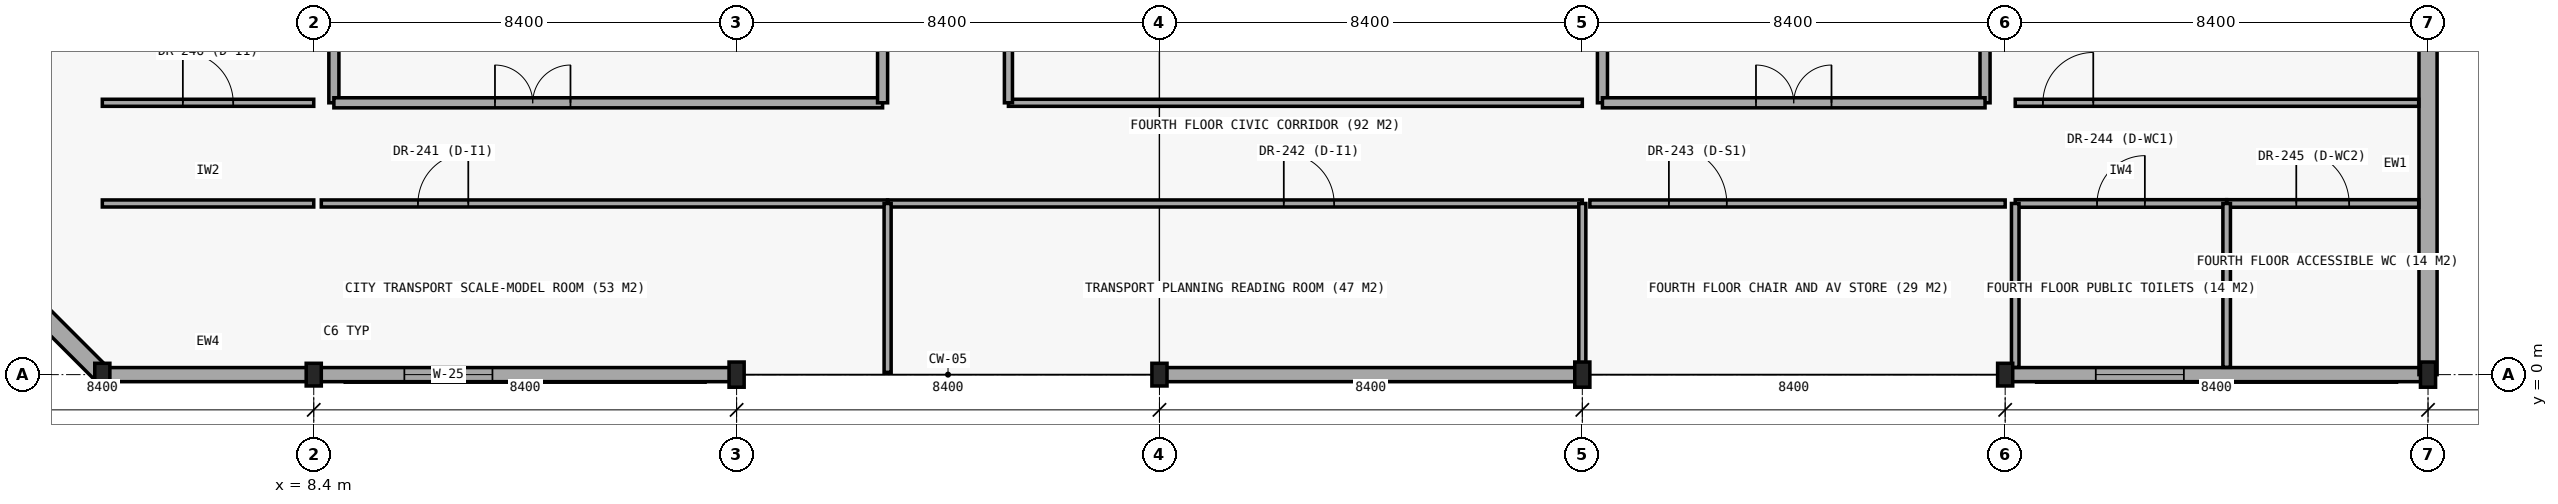
"""IFC4 building model, lengths in metres.
Left out: names, types, materials, properties, quantities, classifications, styles, units other than length and angle.
Written with IfcOpenShell. Run it as: python <this file> out.ifc"""

import sys

from ifc_helpers import new_model, si_unit, direction, frame, frame_2d, origin, origin_2d, place, context, subcontext, project, spatial, rectangle, i_section, extrude, element, fill, save


model = new_model("IFC4")
c1 = context("Model", 3, precision=1e-05, world=origin(), true_north=direction((0.0, 1.0)))
c2 = subcontext(c1, "Body", "Model", "MODEL_VIEW")
j1 = project(units=[si_unit("LENGTHUNIT", "METRE"), si_unit("PLANEANGLEUNIT", "RADIAN")], contexts=[c1])
p1 = place(None, origin())
s1 = spatial("IfcSite", under=j1, at=p1, CompositionType="ELEMENT")
p2 = place(p1, origin())
s2 = spatial("IfcBuilding", under=s1, at=p2, CompositionType="ELEMENT")
p3 = place(p2, frame((0.0, 0.0, 17.4)))
s3 = spatial("IfcBuildingStorey", under=s2, at=p3, CompositionType="ELEMENT", Elevation=17.4)
p4 = place(p3, frame((8.4, 0.0, 0.0), z_axis=(0.0, 0.0, 1.0), x_axis=(1.0, 0.0, 0.0)))
e1 = element("IfcColumn", 1, at=p4, inside=s3, PredefinedType="COLUMN", context=c2, shape_type="SweptSolid", body=[
    extrude(i_section(OverallWidth=0.3, OverallDepth=0.45, WebThickness=0.014, FlangeThickness=0.026, FilletRadius=0.027, at=origin_2d()), origin(), (0.0, 0.0, 1.0), 4.2),
])
p5 = place(p3, frame((16.8, 0.0, 0.0), z_axis=(0.0, 0.0, 1.0), x_axis=(1.0, 0.0, 0.0)))
e2 = element("IfcColumn", 2, at=p5, inside=s3, PredefinedType="COLUMN", context=c2, shape_type="SweptSolid", body=[
    extrude(i_section(OverallWidth=0.3, OverallDepth=0.5, WebThickness=0.014, FlangeThickness=0.028, FilletRadius=0.027, at=origin_2d()), origin(), (0.0, 0.0, 1.0), 4.2),
])
p6 = place(p3, frame((25.2, 0.0, 0.0), z_axis=(0.0, 0.0, 1.0), x_axis=(1.0, 0.0, 0.0)))
e3 = element("IfcColumn", 3, at=p6, inside=s3, PredefinedType="COLUMN", context=c2, shape_type="SweptSolid", body=[
    extrude(i_section(OverallWidth=0.3, OverallDepth=0.45, WebThickness=0.014, FlangeThickness=0.026, FilletRadius=0.027, at=origin_2d()), origin(), (0.0, 0.0, 1.0), 4.2),
])
p7 = place(p3, frame((33.6, 0.0, 0.0), z_axis=(0.0, 0.0, 1.0), x_axis=(1.0, 0.0, 0.0)))
e4 = element("IfcColumn", 4, at=p7, inside=s3, PredefinedType="COLUMN", context=c2, shape_type="SweptSolid", body=[
    extrude(i_section(OverallWidth=0.3, OverallDepth=0.5, WebThickness=0.014, FlangeThickness=0.028, FilletRadius=0.027, at=origin_2d()), origin(), (0.0, 0.0, 1.0), 4.2),
])
p8 = place(p3, frame((42.0, 0.0, 0.0), z_axis=(0.0, 0.0, 1.0), x_axis=(1.0, 0.0, 0.0)))
e5 = element("IfcColumn", 5, at=p8, inside=s3, PredefinedType="COLUMN", context=c2, shape_type="SweptSolid", body=[
    extrude(i_section(OverallWidth=0.3, OverallDepth=0.45, WebThickness=0.014, FlangeThickness=0.026, FilletRadius=0.027, at=origin_2d()), origin(), (0.0, 0.0, 1.0), 4.2),
])
p9 = place(p3, frame((50.4, 0.0, 0.0), z_axis=(0.0, 0.0, 1.0), x_axis=(1.0, 0.0, 0.0)))
e6 = element("IfcColumn", 6, at=p9, inside=s3, PredefinedType="COLUMN", context=c2, shape_type="SweptSolid", body=[
    extrude(i_section(OverallWidth=0.3, OverallDepth=0.5, WebThickness=0.014, FlangeThickness=0.028, FilletRadius=0.027, at=origin_2d()), origin(), (0.0, 0.0, 1.0), 3.958),
])
p10 = place(p3, frame((4.2, 0.0, 0.0), z_axis=(0.0, 0.0, 1.0), x_axis=(1.0, 0.0, 0.0)))
e7 = element("IfcColumn", 7, at=p10, inside=s3, PredefinedType="COLUMN", context=c2, shape_type="SweptSolid", body=[
    extrude(i_section(OverallWidth=0.3, OverallDepth=0.45, WebThickness=0.014, FlangeThickness=0.026, FilletRadius=0.027, at=origin_2d()), origin(), (0.0, 0.0, 1.0), 4.2),
])
p11 = place(p3, frame((4.2, 0.0, 0.0), z_axis=(0.0, 0.0, 1.0), x_axis=(1.0, 0.0, 0.0)))
e8 = element("IfcWall", 8, at=p11, inside=s3, PredefinedType="STANDARD", context=c2, shape_type="SweptSolid", body=[
    extrude(rectangle(XDim=4.2, YDim=0.28, at=frame_2d((2.1, 0.0))), origin(), (0.0, 0.0, 1.0), 3.62),
])
p12 = place(p3, frame((8.4, 0.0, 0.0), z_axis=(0.0, 0.0, 1.0), x_axis=(1.0, 0.0, 0.0)))
e9 = element("IfcWall", 9, at=p12, inside=s3, PredefinedType="STANDARD", context=c2, shape_type="SweptSolid", body=[
    extrude(rectangle(XDim=8.4, YDim=0.28, at=frame_2d((4.2, 0.0))), origin(), (0.0, 0.0, 1.0), 3.62),
])
p13 = place(p12, frame((1.8, 0.0, 0.85)))
e10 = element("IfcOpeningElement", 10, at=p13, cuts=e9, PredefinedType="OPENING", context=c2, shape_type="SweptSolid", body=[
    extrude(rectangle(XDim=1.75, YDim=2.45, at=frame_2d((0.875, 1.225))), frame((0.0, 0.15, 0.0), z_axis=(0.0, -1.0, 0.0), x_axis=(1.0, 0.0, 0.0)), (0.0, 0.0, 1.0), 0.3),
])
p14 = place(p3, frame((25.2, 0.0, 0.0), z_axis=(0.0, 0.0, 1.0), x_axis=(1.0, 0.0, 0.0)))
e11 = element("IfcWall", 11, at=p14, inside=s3, PredefinedType="STANDARD", context=c2, shape_type="SweptSolid", body=[
    extrude(rectangle(XDim=8.4, YDim=0.28, at=frame_2d((4.2, 0.0))), origin(), (0.0, 0.0, 1.0), 3.62),
])
p15 = place(p3, frame((42.0, 0.0, 0.0), z_axis=(0.0, 0.0, 1.0), x_axis=(1.0, 0.0, 0.0)))
e12 = element("IfcWall", 12, at=p15, inside=s3, PredefinedType="STANDARD", context=c2, shape_type="SweptSolid", body=[
    extrude(rectangle(XDim=8.4, YDim=0.28, at=frame_2d((4.2, 0.0))), origin(), (0.0, 0.0, 1.0), 3.62),
])
p16 = place(p15, frame((1.8, 0.0, 0.85)))
e13 = element("IfcOpeningElement", 13, at=p16, cuts=e12, PredefinedType="OPENING", context=c2, shape_type="SweptSolid", body=[
    extrude(rectangle(XDim=1.75, YDim=2.45, at=frame_2d((0.875, 1.225))), frame((0.0, 0.15, 0.0), z_axis=(0.0, -1.0, 0.0), x_axis=(1.0, 0.0, 0.0)), (0.0, 0.0, 1.0), 0.3),
])
p17 = place(p3, frame((50.4, 0.0, 0.0), z_axis=(0.0, 0.0, 1.0), x_axis=(0.0, 1.0, 0.0)))
e14 = element("IfcWall", 14, at=p17, inside=s3, PredefinedType="STANDARD", context=c2, shape_type="SweptSolid", body=[
    extrude(rectangle(XDim=8.4, YDim=0.36, at=frame_2d((4.2, 0.0))), origin(), (0.0, 0.0, 1.0), 3.62),
])
p18 = place(p3, frame((0.0, 4.2, 0.0), z_axis=(0.0, 0.0, 1.0), x_axis=(0.707106781187, -0.707106781187, 0.0)))
e15 = element("IfcWall", 15, at=p18, inside=s3, PredefinedType="STANDARD", context=c2, shape_type="SweptSolid", body=[
    extrude(rectangle(XDim=5.94, YDim=0.36, at=frame_2d((2.97, 0.0))), origin(), (0.0, 0.0, 1.0), 3.62),
])
p19 = place(p18, frame((2.5, 0.0, 1.0)))
e16 = element("IfcOpeningElement", 16, at=p19, cuts=e15, PredefinedType="OPENING", context=c2, shape_type="SweptSolid", body=[
    extrude(rectangle(XDim=0.85, YDim=1.8, at=frame_2d((0.425, 0.9))), frame((0.0, 0.19, 0.0), z_axis=(0.0, -1.0, 0.0), x_axis=(1.0, 0.0, 0.0)), (0.0, 0.0, 1.0), 0.38),
])
p20 = place(p3, frame((8.8, 5.4, 0.0), z_axis=(0.0, 0.0, 1.0), x_axis=(0.0, 1.0, 0.0)))
e17 = element("IfcWall", 17, at=p20, inside=s3, PredefinedType="PARTITIONING", context=c2, shape_type="SweptSolid", body=[
    extrude(rectangle(XDim=2.85, YDim=0.2, at=frame_2d((1.425, 0.0))), origin(), (0.0, 0.0, 1.0), 3.52),
])
p21 = place(p3, frame((8.8, 5.4, 0.0), z_axis=(0.0, 0.0, 1.0), x_axis=(1.0, 0.0, 0.0)))
e18 = element("IfcWall", 18, at=p21, inside=s3, PredefinedType="PARTITIONING", context=c2, shape_type="SweptSolid", body=[
    extrude(rectangle(XDim=10.9, YDim=0.2, at=frame_2d((5.45, 0.0))), origin(), (0.0, 0.0, 1.0), 3.52),
])
p22 = place(p21, frame((3.2, 0.0, 0.0)))
e19 = element("IfcOpeningElement", 19, at=p22, cuts=e18, PredefinedType="OPENING", context=c2, shape_type="SweptSolid", body=[
    extrude(rectangle(XDim=1.5, YDim=2.2, at=frame_2d((0.75, 1.1))), frame((0.0, 0.11, 0.0), z_axis=(0.0, -1.0, 0.0), x_axis=(1.0, 0.0, 0.0)), (0.0, 0.0, 1.0), 0.22),
])
p23 = place(p3, frame((19.7, 5.4, 0.0), z_axis=(0.0, 0.0, 1.0), x_axis=(0.0, 1.0, 0.0)))
e20 = element("IfcWall", 20, at=p23, inside=s3, PredefinedType="PARTITIONING", context=c2, shape_type="SweptSolid", body=[
    extrude(rectangle(XDim=9.6, YDim=0.2, at=frame_2d((4.8, 0.0))), origin(), (0.0, 0.0, 1.0), 3.52),
])
p24 = place(p3, frame((34.0, 5.4, 0.0), z_axis=(0.0, 0.0, 1.0), x_axis=(0.0, 1.0, 0.0)))
e21 = element("IfcWall", 21, at=p24, inside=s3, PredefinedType="PARTITIONING", context=c2, shape_type="SweptSolid", body=[
    extrude(rectangle(XDim=2.85, YDim=0.2, at=frame_2d((1.425, 0.0))), origin(), (0.0, 0.0, 1.0), 3.49),
])
p25 = place(p3, frame((41.6, 5.4, 0.0), z_axis=(0.0, 0.0, 1.0), x_axis=(0.0, 1.0, 0.0)))
e22 = element("IfcWall", 22, at=p25, inside=s3, PredefinedType="PARTITIONING", context=c2, shape_type="SweptSolid", body=[
    extrude(rectangle(XDim=2.85, YDim=0.2, at=frame_2d((1.425, 0.0))), origin(), (0.0, 0.0, 1.0), 3.52),
])
p26 = place(p3, frame((34.0, 5.4, 0.0), z_axis=(0.0, 0.0, 1.0), x_axis=(1.0, 0.0, 0.0)))
e23 = element("IfcWall", 23, at=p26, inside=s3, PredefinedType="PARTITIONING", context=c2, shape_type="SweptSolid", body=[
    extrude(rectangle(XDim=7.6, YDim=0.2, at=frame_2d((3.8, 0.0))), origin(), (0.0, 0.0, 1.0), 3.52),
])
p27 = place(p26, frame((3.05, 0.0, 0.0)))
e24 = element("IfcOpeningElement", 24, at=p27, cuts=e23, PredefinedType="OPENING", context=c2, shape_type="SweptSolid", body=[
    extrude(rectangle(XDim=1.5, YDim=2.2, at=frame_2d((0.75, 1.1))), frame((0.0, 0.11, 0.0), z_axis=(0.0, -1.0, 0.0), x_axis=(1.0, 0.0, 0.0)), (0.0, 0.0, 1.0), 0.22),
])
p28 = place(p3, frame((4.2, 3.4, 0.0), z_axis=(0.0, 0.0, 1.0), x_axis=(1.0, 0.0, 0.0)))
e25 = element("IfcWall", 25, at=p28, inside=s3, PredefinedType="PARTITIONING", context=c2, shape_type="SweptSolid", body=[
    extrude(rectangle(XDim=4.2, YDim=0.14, at=frame_2d((2.1, 0.0))), origin(), (0.0, 0.0, 1.0), 3.5),
])
p29 = place(p3, frame((8.55, 3.4, 0.0), z_axis=(0.0, 0.0, 1.0), x_axis=(1.0, 0.0, 0.0)))
e26 = element("IfcWall", 26, at=p29, inside=s3, PredefinedType="PARTITIONING", context=c2, shape_type="SweptSolid", body=[
    extrude(rectangle(XDim=11.25, YDim=0.14, at=frame_2d((5.625, 0.0))), origin(), (0.0, 0.0, 1.0), 3.5),
])
p30 = place(p29, frame((1.92, 0.0, 0.0)))
e27 = element("IfcOpeningElement", 27, at=p30, cuts=e26, PredefinedType="OPENING", context=c2, shape_type="SweptSolid", body=[
    extrude(rectangle(XDim=1.0, YDim=2.15, at=frame_2d((0.5, 1.075))), frame((0.0, 0.08, 0.0), z_axis=(0.0, -1.0, 0.0), x_axis=(1.0, 0.0, 0.0)), (0.0, 0.0, 1.0), 0.16),
])
p31 = place(p3, frame((19.8, 3.4, 0.0), z_axis=(0.0, 0.0, 1.0), x_axis=(1.0, 0.0, 0.0)))
e28 = element("IfcWall", 28, at=p31, inside=s3, PredefinedType="PARTITIONING", context=c2, shape_type="SweptSolid", body=[
    extrude(rectangle(XDim=13.8, YDim=0.14, at=frame_2d((6.9, 0.0))), origin(), (0.0, 0.0, 1.0), 3.5),
])
p32 = place(p31, frame((7.87, 0.0, 0.0)))
e29 = element("IfcOpeningElement", 29, at=p32, cuts=e28, PredefinedType="OPENING", context=c2, shape_type="SweptSolid", body=[
    extrude(rectangle(XDim=1.0, YDim=2.15, at=frame_2d((0.5, 1.075))), frame((0.0, 0.08, 0.0), z_axis=(0.0, -1.0, 0.0), x_axis=(1.0, 0.0, 0.0)), (0.0, 0.0, 1.0), 0.16),
])
p33 = place(p3, frame((33.75, 3.4, 0.0), z_axis=(0.0, 0.0, 1.0), x_axis=(1.0, 0.0, 0.0)))
e30 = element("IfcWall", 30, at=p33, inside=s3, PredefinedType="PARTITIONING", context=c2, shape_type="SweptSolid", body=[
    extrude(rectangle(XDim=8.25, YDim=0.14, at=frame_2d((4.125, 0.0))), origin(), (0.0, 0.0, 1.0), 3.5),
])
p34 = place(p33, frame((1.57, 0.0, 0.0)))
e31 = element("IfcOpeningElement", 31, at=p34, cuts=e30, PredefinedType="OPENING", context=c2, shape_type="SweptSolid", body=[
    extrude(rectangle(XDim=1.15, YDim=2.15, at=frame_2d((0.575, 1.075))), frame((0.0, 0.08, 0.0), z_axis=(0.0, -1.0, 0.0), x_axis=(1.0, 0.0, 0.0)), (0.0, 0.0, 1.0), 0.16),
])
p35 = place(p3, frame((42.2, 3.4, 0.0), z_axis=(0.0, 0.0, 1.0), x_axis=(1.0, 0.0, 0.0)))
e32 = element("IfcWall", 32, at=p35, inside=s3, PredefinedType="PARTITIONING", context=c2, shape_type="SweptSolid", body=[
    extrude(rectangle(XDim=4.2, YDim=0.15, at=frame_2d((2.1, 0.0))), origin(), (0.0, 0.0, 1.0), 3.5),
])
p36 = place(p35, frame((1.625, 0.0, 0.0)))
e33 = element("IfcOpeningElement", 33, at=p36, cuts=e32, PredefinedType="OPENING", context=c2, shape_type="SweptSolid", body=[
    extrude(rectangle(XDim=0.95, YDim=2.1, at=frame_2d((0.475, 1.05))), frame((0.0, 0.085, 0.0), z_axis=(0.0, -1.0, 0.0), x_axis=(1.0, 0.0, 0.0)), (0.0, 0.0, 1.0), 0.17),
])
p37 = place(p3, frame((46.4, 3.4, 0.0), z_axis=(0.0, 0.0, 1.0), x_axis=(1.0, 0.0, 0.0)))
e34 = element("IfcWall", 34, at=p37, inside=s3, PredefinedType="PARTITIONING", context=c2, shape_type="SweptSolid", body=[
    extrude(rectangle(XDim=3.815, YDim=0.15, at=frame_2d((1.908, 0.0))), origin(), (0.0, 0.0, 1.0), 3.5),
])
p38 = place(p37, frame((1.383, 0.0, 0.0)))
e35 = element("IfcOpeningElement", 35, at=p38, cuts=e34, PredefinedType="OPENING", context=c2, shape_type="SweptSolid", body=[
    extrude(rectangle(XDim=1.05, YDim=2.15, at=frame_2d((0.525, 1.075))), frame((0.0, 0.085, 0.0), z_axis=(0.0, -1.0, 0.0), x_axis=(1.0, 0.0, 0.0)), (0.0, 0.0, 1.0), 0.17),
])
p39 = place(p3, frame((4.2, 5.4, 0.0), z_axis=(0.0, 0.0, 1.0), x_axis=(1.0, 0.0, 0.0)))
e36 = element("IfcWall", 36, at=p39, inside=s3, PredefinedType="PARTITIONING", context=c2, shape_type="SweptSolid", body=[
    extrude(rectangle(XDim=4.2, YDim=0.14, at=frame_2d((2.1, 0.0))), origin(), (0.0, 0.0, 1.0), 3.5),
])
p40 = place(p39, frame((1.6, 0.0, 0.0)))
e37 = element("IfcOpeningElement", 37, at=p40, cuts=e36, PredefinedType="OPENING", context=c2, shape_type="SweptSolid", body=[
    extrude(rectangle(XDim=1.0, YDim=2.15, at=frame_2d((0.5, 1.075))), frame((0.0, 0.08, 0.0), z_axis=(0.0, -1.0, 0.0), x_axis=(1.0, 0.0, 0.0)), (0.0, 0.0, 1.0), 0.16),
])
p41 = place(p3, frame((22.2, 5.4, 0.0), z_axis=(0.0, 0.0, 1.0), x_axis=(1.0, 0.0, 0.0)))
e38 = element("IfcWall", 38, at=p41, inside=s3, PredefinedType="PARTITIONING", context=c2, shape_type="SweptSolid", body=[
    extrude(rectangle(XDim=11.4, YDim=0.14, at=frame_2d((5.7, 0.0))), origin(), (0.0, 0.0, 1.0), 3.5),
])
p42 = place(p3, frame((42.2, 5.4, 0.0), z_axis=(0.0, 0.0, 1.0), x_axis=(1.0, 0.0, 0.0)))
e39 = element("IfcWall", 39, at=p42, inside=s3, PredefinedType="PARTITIONING", context=c2, shape_type="SweptSolid", body=[
    extrude(rectangle(XDim=8.015, YDim=0.14, at=frame_2d((4.008, 0.0))), origin(), (0.0, 0.0, 1.0), 3.5),
])
p43 = place(p42, frame((0.55, 0.0, 0.0)))
e40 = element("IfcOpeningElement", 40, at=p43, cuts=e39, PredefinedType="OPENING", context=c2, shape_type="SweptSolid", body=[
    extrude(rectangle(XDim=1.0, YDim=2.15, at=frame_2d((0.5, 1.075))), frame((0.0, 0.08, 0.0), z_axis=(0.0, -1.0, 0.0), x_axis=(1.0, 0.0, 0.0)), (0.0, 0.0, 1.0), 0.16),
])
p44 = place(p3, frame((19.8, 0.045, 0.0), z_axis=(0.0, 0.0, 1.0), x_axis=(0.0, 1.0, 0.0)))
e41 = element("IfcWall", 41, at=p44, inside=s3, PredefinedType="PARTITIONING", context=c2, shape_type="SweptSolid", body=[
    extrude(rectangle(XDim=3.355, YDim=0.14, at=frame_2d((1.677, 0.0))), origin(), (0.0, 0.0, 1.0), 3.5),
])
p45 = place(p3, frame((22.2, 5.4, 0.0), z_axis=(0.0, 0.0, 1.0), x_axis=(0.0, 1.0, 0.0)))
e42 = element("IfcWall", 42, at=p45, inside=s3, PredefinedType="PARTITIONING", context=c2, shape_type="SweptSolid", body=[
    extrude(rectangle(XDim=16.6, YDim=0.16, at=frame_2d((8.3, 0.0))), origin(), (0.0, 0.0, 1.0), 3.5),
])
p46 = place(p45, frame((4.72, 0.0, 0.0)))
e43 = element("IfcOpeningElement", 43, at=p46, cuts=e42, PredefinedType="OPENING", context=c2, shape_type="SweptSolid", body=[
    extrude(rectangle(XDim=1.0, YDim=2.15, at=frame_2d((0.5, 1.075))), frame((0.0, 0.09, 0.0), z_axis=(0.0, -1.0, 0.0), x_axis=(1.0, 0.0, 0.0)), (0.0, 0.0, 1.0), 0.18),
])
p47 = place(p3, frame((33.6, 0.145, 0.0), z_axis=(0.0, 0.0, 1.0), x_axis=(0.0, 1.0, 0.0)))
e44 = element("IfcWall", 44, at=p47, inside=s3, PredefinedType="PARTITIONING", context=c2, shape_type="SweptSolid", body=[
    extrude(rectangle(XDim=3.255, YDim=0.14, at=frame_2d((1.627, 0.0))), origin(), (0.0, 0.0, 1.0), 3.49),
])
for number, where, z_axis, x_axis in (
    (45, (42.2, 0.145, 0.0), (0.0, 0.0, 1.0), (0.0, 1.0, 0.0)),
    (46, (46.4, 0.145, 0.0), (0.0, 0.0, 1.0), (0.0, 1.0, 0.0)),
):
    element("IfcWall", number, at=place(p3, frame(where, z_axis=z_axis, x_axis=x_axis)), inside=s3, PredefinedType="PARTITIONING", context=c2, shape_type="SweptSolid", body=[
        extrude(rectangle(XDim=3.255, YDim=0.15, at=frame_2d((1.627, 0.0))), origin(), (0.0, 0.0, 1.0), 3.5),
    ])
p48 = place(p13, origin())
e47 = element("IfcWindow", 47, at=p48, inside=s3, PartitioningType="SINGLE_PANEL", PredefinedType="WINDOW", context=c2, shape_type="SweptSolid", body=[
    extrude(rectangle(XDim=1.75, YDim=2.45, at=frame_2d((0.875, 1.225))), frame((0.0, 0.03, 0.0), z_axis=(0.0, -1.0, 0.0), x_axis=(1.0, 0.0, 0.0)), (0.0, 0.0, 1.0), 0.06),
])
fill(e10, e47)
p49 = place(p16, origin())
e48 = element("IfcWindow", 48, at=p49, inside=s3, PartitioningType="SINGLE_PANEL", PredefinedType="WINDOW", context=c2, shape_type="SweptSolid", body=[
    extrude(rectangle(XDim=1.75, YDim=2.45, at=frame_2d((0.875, 1.225))), frame((0.0, 0.03, 0.0), z_axis=(0.0, -1.0, 0.0), x_axis=(1.0, 0.0, 0.0)), (0.0, 0.0, 1.0), 0.06),
])
fill(e13, e48)
p50 = place(p22, origin())
e49 = element("IfcDoor", 49, at=p50, inside=s3, OperationType="DOUBLE_DOOR_SINGLE_SWING", PredefinedType="DOOR", context=c2, shape_type="SweptSolid", body=[
    extrude(rectangle(XDim=1.5, YDim=2.2, at=frame_2d((0.75, 1.1))), frame((0.0, 0.025, 0.0), z_axis=(0.0, -1.0, 0.0), x_axis=(1.0, 0.0, 0.0)), (0.0, 0.0, 1.0), 0.05),
])
fill(e19, e49)
p51 = place(p27, origin())
e50 = element("IfcDoor", 50, at=p51, inside=s3, OperationType="DOUBLE_DOOR_SINGLE_SWING", PredefinedType="DOOR", context=c2, shape_type="SweptSolid", body=[
    extrude(rectangle(XDim=1.5, YDim=2.2, at=frame_2d((0.75, 1.1))), frame((0.0, 0.025, 0.0), z_axis=(0.0, -1.0, 0.0), x_axis=(1.0, 0.0, 0.0)), (0.0, 0.0, 1.0), 0.05),
])
fill(e24, e50)
p52 = place(p30, origin())
e51 = element("IfcDoor", 51, at=p52, inside=s3, OperationType="SINGLE_SWING_RIGHT", PredefinedType="DOOR", context=c2, shape_type="SweptSolid", body=[
    extrude(rectangle(XDim=1.0, YDim=2.15, at=frame_2d((0.5, 1.075))), frame((0.0, 0.025, 0.0), z_axis=(0.0, -1.0, 0.0), x_axis=(1.0, 0.0, 0.0)), (0.0, 0.0, 1.0), 0.05),
])
fill(e27, e51)
p53 = place(p32, origin())
e52 = element("IfcDoor", 52, at=p53, inside=s3, OperationType="SINGLE_SWING_LEFT", PredefinedType="DOOR", context=c2, shape_type="SweptSolid", body=[
    extrude(rectangle(XDim=1.0, YDim=2.15, at=frame_2d((0.5, 1.075))), frame((0.0, 0.025, 0.0), z_axis=(0.0, -1.0, 0.0), x_axis=(1.0, 0.0, 0.0)), (0.0, 0.0, 1.0), 0.05),
])
fill(e29, e52)
p54 = place(p34, origin())
e53 = element("IfcDoor", 53, at=p54, inside=s3, OperationType="SINGLE_SWING_LEFT", PredefinedType="DOOR", context=c2, shape_type="SweptSolid", body=[
    extrude(rectangle(XDim=1.15, YDim=2.15, at=frame_2d((0.575, 1.075))), frame((0.0, 0.025, 0.0), z_axis=(0.0, -1.0, 0.0), x_axis=(1.0, 0.0, 0.0)), (0.0, 0.0, 1.0), 0.05),
])
fill(e31, e53)
p55 = place(p36, origin())
e54 = element("IfcDoor", 54, at=p55, inside=s3, OperationType="SINGLE_SWING_RIGHT", PredefinedType="DOOR", context=c2, shape_type="SweptSolid", body=[
    extrude(rectangle(XDim=0.95, YDim=2.1, at=frame_2d((0.475, 1.05))), frame((0.0, 0.025, 0.0), z_axis=(0.0, -1.0, 0.0), x_axis=(1.0, 0.0, 0.0)), (0.0, 0.0, 1.0), 0.05),
])
fill(e33, e54)
p56 = place(p38, origin())
e55 = element("IfcDoor", 55, at=p56, inside=s3, OperationType="SINGLE_SWING_LEFT", PredefinedType="DOOR", context=c2, shape_type="SweptSolid", body=[
    extrude(rectangle(XDim=1.05, YDim=2.15, at=frame_2d((0.525, 1.075))), frame((0.0, 0.025, 0.0), z_axis=(0.0, -1.0, 0.0), x_axis=(1.0, 0.0, 0.0)), (0.0, 0.0, 1.0), 0.05),
])
fill(e35, e55)
p57 = place(p40, origin())
e56 = element("IfcDoor", 56, at=p57, inside=s3, OperationType="SINGLE_SWING_LEFT", PredefinedType="DOOR", context=c2, shape_type="SweptSolid", body=[
    extrude(rectangle(XDim=1.0, YDim=2.15, at=frame_2d((0.5, 1.075))), frame((0.0, 0.025, 0.0), z_axis=(0.0, -1.0, 0.0), x_axis=(1.0, 0.0, 0.0)), (0.0, 0.0, 1.0), 0.05),
])
fill(e37, e56)
p58 = place(p43, origin())
e57 = element("IfcDoor", 57, at=p58, inside=s3, OperationType="SINGLE_SWING_RIGHT", PredefinedType="DOOR", context=c2, shape_type="SweptSolid", body=[
    extrude(rectangle(XDim=1.0, YDim=2.15, at=frame_2d((0.5, 1.075))), frame((0.0, 0.025, 0.0), z_axis=(0.0, -1.0, 0.0), x_axis=(1.0, 0.0, 0.0)), (0.0, 0.0, 1.0), 0.05),
])
fill(e40, e57)
save(model, sys.argv[1])
